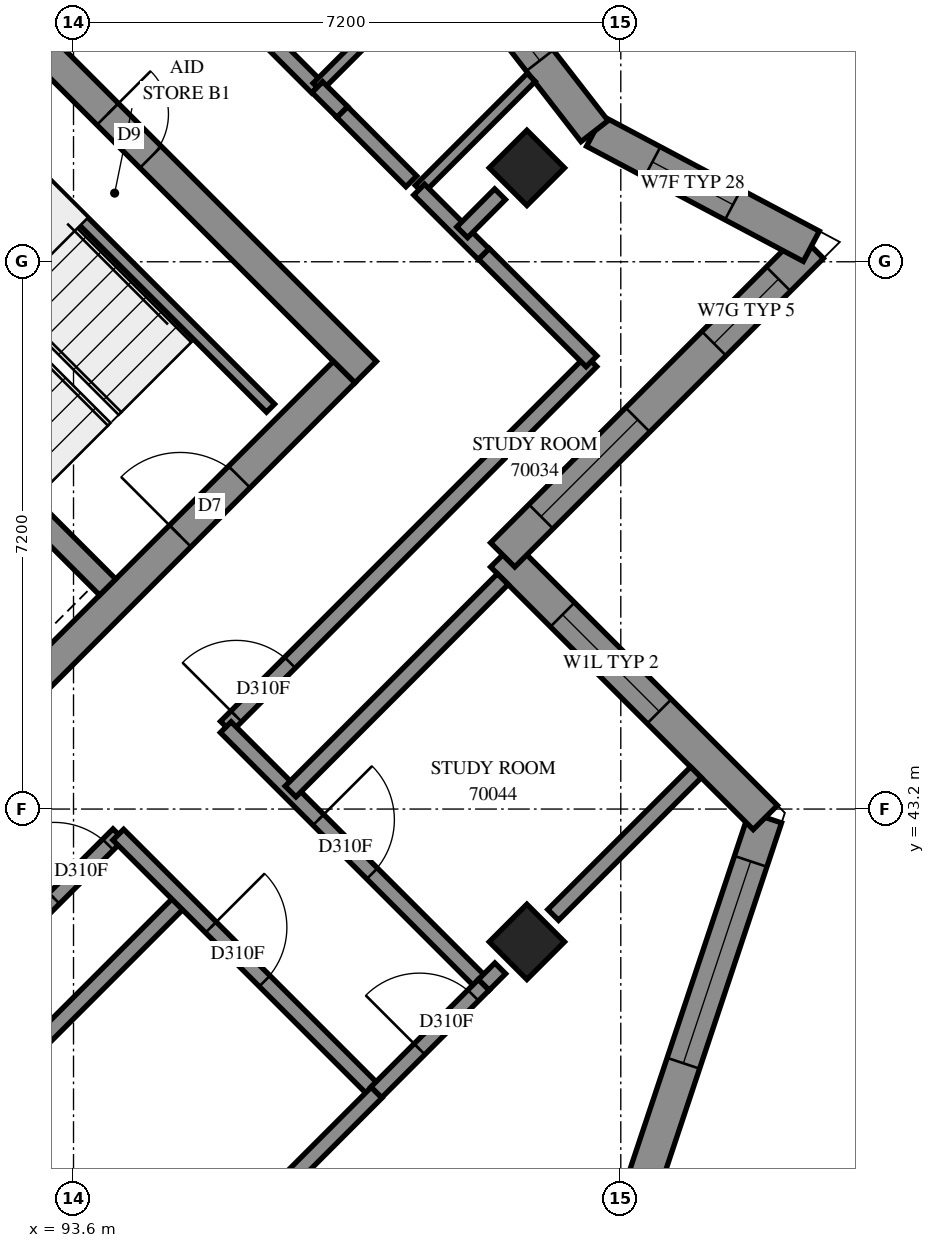
"""IFC4 building model, lengths in metres.
Left out: names, types, materials, properties, quantities, classifications, styles, units other than length and angle.
Written with IfcOpenShell. Run it as: python <this file> out.ifc"""

import sys

from ifc_helpers import new_model, si_unit, direction, frame, frame_2d, origin, origin_2d, place, context, subcontext, project, spatial, polyline, rectangle, outline, extrude, element, fill, save


model = new_model("IFC4")
c1 = context("Model", 3, precision=1e-05, world=origin(), true_north=direction((0.0, 1.0)))
c2 = subcontext(c1, "Body", "Model", "MODEL_VIEW")
j1 = project(units=[si_unit("LENGTHUNIT", "METRE"), si_unit("PLANEANGLEUNIT", "RADIAN")], contexts=[c1])
p1 = place(None, origin())
s1 = spatial("IfcSite", under=j1, at=p1, CompositionType="ELEMENT")
p2 = place(p1, origin())
s2 = spatial("IfcBuilding", under=s1, at=p2, CompositionType="ELEMENT")
p3 = place(p2, frame((0.0, 0.0, 257.4)))
s3 = spatial("IfcBuildingStorey", under=s2, at=p3, CompositionType="ELEMENT", Elevation=257.4)
for number, where, z_axis, x_axis in (
    (1, (99.565, 51.635, 0.0), (0.0, 0.0, 1.0), (0.707, -0.707, 0.0)),
    (2, (99.565, 41.453, 0.0), (0.0, 0.0, 1.0), (0.707, -0.707, 0.0)),
):
    element("IfcColumn", number, at=place(p3, frame(where, z_axis=z_axis, x_axis=x_axis)), inside=s3, PredefinedType="COLUMN", context=c2, shape_type="SweptSolid", body=[
        extrude(rectangle(XDim=0.7, YDim=0.7, at=origin_2d()), origin(), (0.0, 0.0, 1.0), 3.1),
    ])
p4 = place(p3, frame((86.695, 59.696, -0.3), z_axis=(0.0, 0.0, 1.0), x_axis=(0.7071100706, -0.7071034917, 0.0)))
e3 = element("IfcWall", 3, at=p4, inside=s3, PredefinedType="SHEAR", context=c2, shape_type="SweptSolid", body=[
    extrude(rectangle(XDim=15.2, YDim=0.4, at=frame_2d((7.6, 0.0))), origin(), (0.0, 0.0, 1.0), 2.7),
])
p5 = place(p4, frame((10.4, 0.0, 0.3)))
e4 = element("IfcOpeningElement", 4, at=p5, cuts=e3, PredefinedType="OPENING", context=c2, shape_type="SweptSolid", body=[
    extrude(rectangle(XDim=0.8, YDim=2.1, at=frame_2d((0.4, 1.05))), frame((0.0, 0.21, 0.0), z_axis=(0.0, -1.0, 0.0), x_axis=(1.0, 0.0, 0.0)), (0.0, 0.0, 1.0), 0.42),
])
p6 = place(p3, frame((86.978, 38.766, -0.3), z_axis=(0.0, 0.0, 1.0), x_axis=(0.7071067812, 0.7071067812, 0.0)))
e5 = element("IfcWall", 5, at=p6, inside=s3, PredefinedType="SHEAR", context=c2, shape_type="SweptSolid", body=[
    extrude(rectangle(XDim=14.4, YDim=0.4, at=frame_2d((7.2, 0.0))), origin(), (0.0, 0.0, 1.0), 2.7),
])
p7 = place(p6, frame((4.55, 0.0, 0.3)))
e6 = element("IfcOpeningElement", 6, at=p7, cuts=e5, PredefinedType="OPENING", context=c2, shape_type="SweptSolid", body=[
    extrude(rectangle(XDim=1.1, YDim=2.1, at=frame_2d((0.55, 1.05))), frame((0.0, 0.21, 0.0), z_axis=(0.0, -1.0, 0.0), x_axis=(1.0, 0.0, 0.0)), (0.0, 0.0, 1.0), 0.42),
])
p8 = place(p6, frame((11.35, 0.0, 0.3)))
e7 = element("IfcOpeningElement", 7, at=p8, cuts=e5, PredefinedType="OPENING", context=c2, shape_type="SweptSolid", body=[
    extrude(rectangle(XDim=1.1, YDim=2.1, at=frame_2d((0.55, 1.05))), frame((0.0, 0.21, 0.0), z_axis=(0.0, -1.0, 0.0), x_axis=(1.0, 0.0, 0.0)), (0.0, 0.0, 1.0), 0.42),
])
p9 = place(p3, frame((88.958, 51.211, 0.0), z_axis=(0.0, 0.0, 1.0), x_axis=(0.7070998367, -0.7071137256, 0.0)))
e8 = element("IfcWall", 8, at=p9, inside=s3, PredefinedType="SOLIDWALL", context=c2, shape_type="SweptSolid", body=[
    extrude(rectangle(XDim=7.2, YDim=0.3, at=frame_2d((3.6, 0.0))), origin(), (0.0, 0.0, 1.0), 3.1),
])
p10 = place(p3, frame((101.082, 38.232, 0.0), z_axis=(0.0, 0.0, 1.0), x_axis=(0.316227766, 0.9486832981, 0.0)))
e9 = element("IfcWall", 9, at=p10, inside=s3, PredefinedType="SOLIDWALL", context=c2, shape_type="SweptSolid", body=[
    extrude(outline(polyline([(-0.108, -0.225), (5.259, -0.225), (4.981, 0.225), (0.108, 0.225), (-0.108, -0.225)])), origin(), (0.0, 0.0, 1.0), 3.1),
])
p11 = place(p10, frame((1.711, 0.0, 0.45)))
e10 = element("IfcOpeningElement", 10, at=p11, cuts=e9, PredefinedType="OPENING", context=c2, shape_type="SweptSolid", body=[
    extrude(rectangle(XDim=2.8, YDim=2.55, at=frame_2d((1.4, 1.275))), frame((0.0, 0.235, 0.0), z_axis=(0.0, -1.0, 0.0), x_axis=(1.0, 0.0, 0.0)), (0.0, 0.0, 1.0), 0.47),
])
p12 = place(p3, frame((102.701, 43.089, 0.0), z_axis=(0.0, 0.0, 1.0), x_axis=(-0.7070965479, 0.7071170144, 0.0)))
e11 = element("IfcWall", 11, at=p12, inside=s3, PredefinedType="SOLIDWALL", context=c2, shape_type="SweptSolid", body=[
    extrude(outline(polyline([(-0.139, -0.225), (4.661, -0.225), (5.111, 0.225), (0.139, 0.225), (-0.139, -0.225)])), origin(), (0.0, 0.0, 1.0), 3.1),
])
p13 = place(p12, frame((1.974, 0.0, 0.6)))
e12 = element("IfcOpeningElement", 12, at=p13, cuts=e11, PredefinedType="OPENING", context=c2, shape_type="SweptSolid", body=[
    extrude(rectangle(XDim=1.8, YDim=1.9, at=frame_2d((0.9, 0.95))), frame((0.0, 0.235, 0.0), z_axis=(0.0, -1.0, 0.0), x_axis=(1.0, 0.0, 0.0)), (0.0, 0.0, 1.0), 0.47),
])
p14 = place(p3, frame((99.246, 46.544, 0.0), z_axis=(0.0, 0.0, 1.0), x_axis=(0.7071067812, 0.7071067812, 0.0)))
e13 = element("IfcWall", 13, at=p14, inside=s3, PredefinedType="SOLIDWALL", context=c2, shape_type="SweptSolid", body=[
    extrude(outline(polyline([(0.225, -0.225), (6.046, -0.225), (5.437, 0.225), (-0.225, 0.225), (0.225, -0.225)])), origin(), (0.0, 0.0, 1.0), 3.1),
])
p15 = place(p14, frame((0.713, 0.0, 0.6)))
e14 = element("IfcOpeningElement", 14, at=p15, cuts=e13, PredefinedType="OPENING", context=c2, shape_type="SweptSolid", body=[
    extrude(rectangle(XDim=1.8, YDim=1.9, at=frame_2d((0.9, 0.95))), frame((0.0, 0.235, 0.0), z_axis=(0.0, -1.0, 0.0), x_axis=(1.0, 0.0, 0.0)), (0.0, 0.0, 1.0), 0.47),
])
p16 = place(p14, frame((3.931, 0.0, 0.6)))
e15 = element("IfcOpeningElement", 15, at=p16, cuts=e13, PredefinedType="OPENING", context=c2, shape_type="SweptSolid", body=[
    extrude(rectangle(XDim=1.2, YDim=1.9, at=frame_2d((0.6, 0.95))), frame((0.0, 0.235, 0.0), z_axis=(0.0, -1.0, 0.0), x_axis=(1.0, 0.0, 0.0)), (0.0, 0.0, 1.0), 0.47),
])
p17 = place(p3, frame((103.306, 50.604, 0.0), z_axis=(0.0, 0.0, 1.0), x_axis=(-0.8832472045, 0.468907641, 0.0)))
e16 = element("IfcWall", 16, at=p17, inside=s3, PredefinedType="SOLIDWALL", context=c2, shape_type="SweptSolid", body=[
    extrude(outline(polyline([(-0.304, -0.225), (3.181, -0.225), (3.277, 0.225), (0.304, 0.225), (-0.304, -0.225)])), origin(), (0.0, 0.0, 1.0), 3.1),
])
p18 = place(p17, frame((1.167, 0.0, 0.45)))
e17 = element("IfcOpeningElement", 17, at=p18, cuts=e16, PredefinedType="OPENING", context=c2, shape_type="SweptSolid", body=[
    extrude(rectangle(XDim=1.2, YDim=2.55, at=frame_2d((0.6, 1.275))), frame((0.0, 0.235, 0.0), z_axis=(0.0, -1.0, 0.0), x_axis=(1.0, 0.0, 0.0)), (0.0, 0.0, 1.0), 0.47),
])
p19 = place(p3, frame((100.454, 52.118, 0.0), z_axis=(0.0, 0.0, 1.0), x_axis=(-0.6128744429, 0.7901803068, 0.0)))
e18 = element("IfcWall", 18, at=p19, inside=s3, PredefinedType="SOLIDWALL", context=c2, shape_type="SweptSolid", body=[
    extrude(outline(polyline([(0.048, -0.225), (3.407, -0.225), (3.35, 0.225), (-0.048, 0.225), (0.048, -0.225)])), origin(), (0.0, 0.0, 1.0), 3.1),
])
p20 = place(p19, frame((1.175, 0.0, 0.45)))
e19 = element("IfcOpeningElement", 19, at=p20, cuts=e18, PredefinedType="OPENING", context=c2, shape_type="SweptSolid", body=[
    extrude(rectangle(XDim=1.2, YDim=2.55, at=frame_2d((0.6, 1.275))), frame((0.0, 0.235, 0.0), z_axis=(0.0, -1.0, 0.0), x_axis=(1.0, 0.0, 0.0)), (0.0, 0.0, 1.0), 0.47),
])
p21 = place(p3, frame((91.313, 53.354, 0.0), z_axis=(0.0, 0.0, 1.0), x_axis=(0.7071140275, -0.7070995348, 0.0)))
e20 = element("IfcWall", 20, at=p21, inside=s3, PredefinedType="PARTITIONING", context=c2, shape_type="SweptSolid", body=[
    extrude(rectangle(XDim=6.9, YDim=0.15, at=frame_2d((3.45, 0.0))), origin(), (0.0, 0.0, 1.0), 3.1),
])
p22 = place(p3, frame((84.949, 31.932, 0.0), z_axis=(0.0, 0.0, 1.0), x_axis=(0.7071768688, 0.7070366866, 0.0)))
e21 = element("IfcWall", 21, at=p22, inside=s3, PredefinedType="PARTITIONING", context=c2, shape_type="SweptSolid", body=[
    extrude(rectangle(XDim=14.267, YDim=0.2, at=frame_2d((7.134, 0.0))), origin(), (0.0, 0.0, 1.0), 3.1),
])
p23 = place(p3, frame((86.836, 35.514, 0.0), z_axis=(0.0, 0.0, 1.0), x_axis=(0.7071067812, 0.7071067812, 0.0)))
e22 = element("IfcWall", 22, at=p23, inside=s3, PredefinedType="PARTITIONING", context=c2, shape_type="SweptSolid", body=[
    extrude(rectangle(XDim=10.4, YDim=0.2, at=frame_2d((5.2, 0.0))), origin(), (0.0, 0.0, 1.0), 3.1),
])
p24 = place(p23, frame((9.207, 0.0, 0.0)))
e23 = element("IfcOpeningElement", 23, at=p24, cuts=e22, PredefinedType="OPENING", context=c2, shape_type="SweptSolid", body=[
    extrude(rectangle(XDim=1.0, YDim=2.1, at=frame_2d((0.5, 1.05))), frame((0.0, 0.11, 0.0), z_axis=(0.0, -1.0, 0.0), x_axis=(1.0, 0.0, 0.0)), (0.0, 0.0, 1.0), 0.22),
])
p25 = place(p3, frame((95.605, 44.283, 0.0), z_axis=(0.0, 0.0, 1.0), x_axis=(0.7071067812, 0.7071067812, 0.0)))
e24 = element("IfcWall", 24, at=p25, inside=s3, PredefinedType="PARTITIONING", context=c2, shape_type="SweptSolid", body=[
    extrude(rectangle(XDim=6.8, YDim=0.2, at=frame_2d((3.4, 0.0))), origin(), (0.0, 0.0, 1.0), 3.1),
])
p26 = place(p25, frame((0.193, 0.0, 0.0)))
e25 = element("IfcOpeningElement", 25, at=p26, cuts=e24, PredefinedType="OPENING", context=c2, shape_type="SweptSolid", body=[
    extrude(rectangle(XDim=1.0, YDim=2.1, at=frame_2d((0.5, 1.05))), frame((0.0, 0.11, 0.0), z_axis=(0.0, -1.0, 0.0), x_axis=(1.0, 0.0, 0.0)), (0.0, 0.0, 1.0), 0.22),
])
p27 = place(p3, frame((95.603, 44.277, 0.0), z_axis=(0.0, 0.0, 1.0), x_axis=(0.7071067812, -0.7071067812, 0.0)))
e26 = element("IfcWall", 26, at=p27, inside=s3, PredefinedType="PARTITIONING", context=c2, shape_type="SweptSolid", body=[
    extrude(rectangle(XDim=4.797, YDim=0.2, at=frame_2d((2.398, 0.0))), origin(), (0.0, 0.0, 1.0), 3.1),
])
p28 = place(p27, frame((1.723, 0.0, 0.0)))
e27 = element("IfcOpeningElement", 27, at=p28, cuts=e26, PredefinedType="OPENING", context=c2, shape_type="SweptSolid", body=[
    extrude(rectangle(XDim=1.0, YDim=2.1, at=frame_2d((0.5, 1.05))), frame((0.0, 0.11, 0.0), z_axis=(0.0, -1.0, 0.0), x_axis=(1.0, 0.0, 0.0)), (0.0, 0.0, 1.0), 0.22),
])
p29 = place(p3, frame((94.189, 42.863, 0.0), z_axis=(0.0, 0.0, 1.0), x_axis=(0.7071067812, -0.7071067812, 0.0)))
e28 = element("IfcWall", 28, at=p29, inside=s3, PredefinedType="PARTITIONING", context=c2, shape_type="SweptSolid", body=[
    extrude(rectangle(XDim=4.797, YDim=0.2, at=frame_2d((2.398, 0.0))), origin(), (0.0, 0.0, 1.0), 3.1),
])
p30 = place(p29, frame((1.723, 0.0, 0.0)))
e29 = element("IfcOpeningElement", 29, at=p30, cuts=e28, PredefinedType="OPENING", context=c2, shape_type="SweptSolid", body=[
    extrude(rectangle(XDim=1.0, YDim=2.1, at=frame_2d((0.5, 1.05))), frame((0.0, 0.11, 0.0), z_axis=(0.0, -1.0, 0.0), x_axis=(1.0, 0.0, 0.0)), (0.0, 0.0, 1.0), 0.22),
])
p31 = place(p3, frame((93.621, 55.875, 0.0), z_axis=(0.0, 0.0, 1.0), x_axis=(0.7071067812, -0.7071067812, 0.0)))
e30 = element("IfcWall", 30, at=p31, inside=s3, PredefinedType="PARTITIONING", context=c2, shape_type="SweptSolid", body=[
    extrude(rectangle(XDim=4.5, YDim=0.2, at=frame_2d((2.25, 0.0))), origin(), (0.0, 0.0, 1.0), 3.1),
])
p32 = place(p31, frame((0.465, 0.0, 0.0)))
e31 = element("IfcOpeningElement", 31, at=p32, cuts=e30, PredefinedType="OPENING", context=c2, shape_type="SweptSolid", body=[
    extrude(rectangle(XDim=0.9, YDim=2.1, at=frame_2d((0.45, 1.05))), frame((0.0, 0.11, 0.0), z_axis=(0.0, -1.0, 0.0), x_axis=(1.0, 0.0, 0.0)), (0.0, 0.0, 1.0), 0.22),
])
p33 = place(p3, frame((94.828, 36.709, 0.0), z_axis=(0.0, 0.0, 1.0), x_axis=(0.7068506295, 0.7073628401, 0.0)))
e32 = element("IfcWall", 32, at=p33, inside=s3, PredefinedType="PARTITIONING", context=c2, shape_type="SweptSolid", body=[
    extrude(rectangle(XDim=3.905, YDim=0.2, at=frame_2d((1.952, 0.0))), origin(), (0.0, 0.0, 1.0), 2.6),
])
p34 = place(p3, frame((96.455, 43.431, 0.0), z_axis=(0.0, 0.0, 1.0), x_axis=(0.7068409254, 0.707372537, 0.0)))
e33 = element("IfcWall", 33, at=p34, inside=s3, PredefinedType="PARTITIONING", context=c2, shape_type="SweptSolid", body=[
    extrude(rectangle(XDim=3.95, YDim=0.2, at=frame_2d((1.975, 0.0))), origin(), (0.0, 0.0, 1.0), 3.1),
])
p35 = place(p3, frame((99.91, 41.807, 0.0), z_axis=(0.0, 0.0, 1.0), x_axis=(0.7075021757, 0.7067111654, 0.0)))
e34 = element("IfcWall", 34, at=p35, inside=s3, PredefinedType="PARTITIONING", context=c2, shape_type="SweptSolid", body=[
    extrude(rectangle(XDim=2.655, YDim=0.2, at=frame_2d((1.327, 0.0))), origin(), (0.0, 0.0, 1.0), 3.1),
])
p36 = place(p3, frame((96.806, 52.696, 0.0), z_axis=(0.0, 0.0, 1.0), x_axis=(0.7071067812, 0.7071067812, 0.0)))
e35 = element("IfcWall", 35, at=p36, inside=s3, PredefinedType="PARTITIONING", context=c2, shape_type="SweptSolid", body=[
    extrude(rectangle(XDim=2.322, YDim=0.15, at=frame_2d((1.161, 0.0))), origin(), (0.0, 0.0, 1.0), 3.1),
])
p37 = place(p36, frame((1.212, 0.0, 0.0)))
e36 = element("IfcOpeningElement", 36, at=p37, cuts=e35, PredefinedType="OPENING", context=c2, shape_type="SweptSolid", body=[
    extrude(rectangle(XDim=0.8, YDim=2.1, at=frame_2d((0.4, 1.05))), frame((0.0, 0.085, 0.0), z_axis=(0.0, -1.0, 0.0), x_axis=(1.0, 0.0, 0.0)), (0.0, 0.0, 1.0), 0.17),
])
p38 = place(p3, frame((98.149, 51.353, 0.0), z_axis=(0.0, 0.0, 1.0), x_axis=(0.7070827679, 0.7071307936, 0.0)))
e37 = element("IfcWall", 37, at=p38, inside=s3, PredefinedType="PARTITIONING", context=c2, shape_type="SweptSolid", body=[
    extrude(rectangle(XDim=2.082, YDim=0.15, at=frame_2d((1.041, 0.0))), origin(), (0.0, 0.0, 1.0), 3.1),
])
p39 = place(p3, frame((98.998, 50.504, 0.0), z_axis=(0.0, 0.0, 1.0), x_axis=(0.7076063266, -0.7066068826, 0.0)))
e38 = element("IfcWall", 38, at=p39, inside=s3, PredefinedType="PARTITIONING", context=c2, shape_type="SweptSolid", body=[
    extrude(rectangle(XDim=2.001, YDim=0.2, at=frame_2d((1.001, 0.0))), origin(), (0.0, 0.0, 1.0), 3.1),
])
p40 = place(p3, frame((97.584, 39.474, 0.0), z_axis=(0.0, 0.0, 1.0), x_axis=(0.7071067812, 0.7071067812, 0.0)))
e39 = element("IfcWall", 39, at=p40, inside=s3, PredefinedType="PARTITIONING", context=c2, shape_type="SweptSolid", body=[
    extrude(rectangle(XDim=2.0, YDim=0.2, at=frame_2d((1.0, 0.0))), origin(), (0.0, 0.0, 1.0), 2.6),
])
p41 = place(p40, frame((0.803, 0.0, 0.0)))
e40 = element("IfcOpeningElement", 40, at=p41, cuts=e39, PredefinedType="OPENING", context=c2, shape_type="SweptSolid", body=[
    extrude(rectangle(XDim=1.0, YDim=2.1, at=frame_2d((0.5, 1.05))), frame((0.0, 0.11, 0.0), z_axis=(0.0, -1.0, 0.0), x_axis=(1.0, 0.0, 0.0)), (0.0, 0.0, 1.0), 0.22),
])
p42 = place(p3, frame((97.134, 52.37, 0.0), z_axis=(0.0, 0.0, 1.0), x_axis=(0.7063301682, -0.7078825422, 0.0)))
e41 = element("IfcWall", 41, at=p42, inside=s3, PredefinedType="PARTITIONING", context=c2, shape_type="SweptSolid", body=[
    extrude(rectangle(XDim=1.288, YDim=0.2, at=frame_2d((0.644, 0.0))), origin(), (0.0, 0.0, 1.0), 3.1),
])
p43 = place(p3, frame((98.147, 51.349, 0.0), z_axis=(0.0, 0.0, 1.0), x_axis=(0.7071067812, -0.7071067812, 0.0)))
e42 = element("IfcWall", 42, at=p43, inside=s3, PredefinedType="PARTITIONING", context=c2, shape_type="SweptSolid", body=[
    extrude(rectangle(XDim=1.199, YDim=0.2, at=frame_2d((0.6, 0.0))), origin(), (0.0, 0.0, 1.0), 3.1),
])
p44 = place(p3, frame((98.714, 50.788, 0.0), z_axis=(0.0, 0.0, 1.0), x_axis=(0.7056883165, 0.7085224061, 0.0)))
e43 = element("IfcWall", 43, at=p44, inside=s3, PredefinedType="PARTITIONING", context=c2, shape_type="SweptSolid", body=[
    extrude(rectangle(XDim=0.706, YDim=0.2, at=frame_2d((0.353, 0.0))), origin(), (0.0, 0.0, 1.0), 3.1),
])
p45 = place(p3, frame((96.807, 52.697, 0.0), z_axis=(0.0, 0.0, 1.0), x_axis=(0.7092658707, -0.7049410788, 0.0)))
e44 = element("IfcWall", 44, at=p45, inside=s3, PredefinedType="PARTITIONING", context=c2, shape_type="SweptSolid", body=[
    extrude(rectangle(XDim=0.462, YDim=0.2, at=frame_2d((0.231, 0.0))), origin(), (0.0, 0.0, 1.0), 3.1),
])
p46 = place(p3, frame((98.998, 40.888, 0.0), z_axis=(0.0, 0.0, 1.0), x_axis=(0.7071067812, 0.7071067812, 0.0)))
e45 = element("IfcWall", 45, at=p46, inside=s3, PredefinedType="PARTITIONING", context=c2, shape_type="SweptSolid", body=[
    extrude(rectangle(XDim=0.305, YDim=0.2, at=frame_2d((0.153, 0.0))), origin(), (0.0, 0.0, 1.0), 2.6),
])
p47 = place(p11, origin())
e46 = element("IfcWindow", 46, at=p47, inside=s3, PartitioningType="SINGLE_PANEL", PredefinedType="WINDOW", context=c2, shape_type="SweptSolid", body=[
    extrude(rectangle(XDim=2.8, YDim=2.55, at=frame_2d((1.4, 1.275))), frame((0.0, 0.205, 0.0), z_axis=(0.0, -1.0, 0.0), x_axis=(1.0, 0.0, 0.0)), (0.0, 0.0, 1.0), 0.06),
])
fill(e10, e46)
p48 = place(p13, origin())
e47 = element("IfcWindow", 47, at=p48, inside=s3, PartitioningType="SINGLE_PANEL", PredefinedType="WINDOW", context=c2, shape_type="SweptSolid", body=[
    extrude(rectangle(XDim=1.8, YDim=1.9, at=frame_2d((0.9, 0.95))), frame((0.0, 0.205, 0.0), z_axis=(0.0, -1.0, 0.0), x_axis=(1.0, 0.0, 0.0)), (0.0, 0.0, 1.0), 0.06),
])
fill(e12, e47)
p49 = place(p15, origin())
e48 = element("IfcWindow", 48, at=p49, inside=s3, PartitioningType="SINGLE_PANEL", PredefinedType="WINDOW", context=c2, shape_type="SweptSolid", body=[
    extrude(rectangle(XDim=1.8, YDim=1.9, at=frame_2d((0.9, 0.95))), frame((0.0, 0.205, 0.0), z_axis=(0.0, -1.0, 0.0), x_axis=(1.0, 0.0, 0.0)), (0.0, 0.0, 1.0), 0.06),
])
fill(e14, e48)
p50 = place(p16, origin())
e49 = element("IfcWindow", 49, at=p50, inside=s3, PartitioningType="SINGLE_PANEL", PredefinedType="WINDOW", context=c2, shape_type="SweptSolid", body=[
    extrude(rectangle(XDim=1.2, YDim=1.9, at=frame_2d((0.6, 0.95))), frame((0.0, 0.205, 0.0), z_axis=(0.0, -1.0, 0.0), x_axis=(1.0, 0.0, 0.0)), (0.0, 0.0, 1.0), 0.06),
])
fill(e15, e49)
p51 = place(p18, origin())
e50 = element("IfcWindow", 50, at=p51, inside=s3, PartitioningType="SINGLE_PANEL", PredefinedType="WINDOW", context=c2, shape_type="SweptSolid", body=[
    extrude(rectangle(XDim=1.2, YDim=2.55, at=frame_2d((0.6, 1.275))), frame((0.0, 0.205, 0.0), z_axis=(0.0, -1.0, 0.0), x_axis=(1.0, 0.0, 0.0)), (0.0, 0.0, 1.0), 0.06),
])
fill(e17, e50)
p52 = place(p20, origin())
e51 = element("IfcWindow", 51, at=p52, inside=s3, PartitioningType="SINGLE_PANEL", PredefinedType="WINDOW", context=c2, shape_type="SweptSolid", body=[
    extrude(rectangle(XDim=1.2, YDim=2.55, at=frame_2d((0.6, 1.275))), frame((0.0, 0.205, 0.0), z_axis=(0.0, -1.0, 0.0), x_axis=(1.0, 0.0, 0.0)), (0.0, 0.0, 1.0), 0.06),
])
fill(e19, e51)
p53 = place(p5, origin())
e52 = element("IfcDoor", 52, at=p53, inside=s3, OperationType="SINGLE_SWING_RIGHT", PredefinedType="DOOR", context=c2, shape_type="SweptSolid", body=[
    extrude(rectangle(XDim=0.8, YDim=2.1, at=frame_2d((0.4, 1.05))), frame((0.0, 0.025, 0.0), z_axis=(0.0, -1.0, 0.0), x_axis=(1.0, 0.0, 0.0)), (0.0, 0.0, 1.0), 0.05),
])
fill(e4, e52)
p54 = place(p8, origin())
e53 = element("IfcDoor", 53, at=p54, inside=s3, OperationType="SINGLE_SWING_RIGHT", PredefinedType="DOOR", context=c2, shape_type="SweptSolid", body=[
    extrude(rectangle(XDim=1.1, YDim=2.1, at=frame_2d((0.55, 1.05))), frame((0.0, 0.025, 0.0), z_axis=(0.0, -1.0, 0.0), x_axis=(1.0, 0.0, 0.0)), (0.0, 0.0, 1.0), 0.05),
])
fill(e7, e53)
p55 = place(p26, origin())
e54 = element("IfcDoor", 54, at=p55, inside=s3, OperationType="SINGLE_SWING_LEFT", PredefinedType="DOOR", context=c2, shape_type="SweptSolid", body=[
    extrude(rectangle(XDim=1.0, YDim=2.1, at=frame_2d((0.5, 1.05))), frame((0.0, 0.025, 0.0), z_axis=(0.0, -1.0, 0.0), x_axis=(1.0, 0.0, 0.0)), (0.0, 0.0, 1.0), 0.05),
])
fill(e25, e54)
p56 = place(p24, origin())
e55 = element("IfcDoor", 55, at=p56, inside=s3, OperationType="SINGLE_SWING_RIGHT", PredefinedType="DOOR", context=c2, shape_type="SweptSolid", body=[
    extrude(rectangle(XDim=1.0, YDim=2.1, at=frame_2d((0.5, 1.05))), frame((0.0, 0.025, 0.0), z_axis=(0.0, -1.0, 0.0), x_axis=(1.0, 0.0, 0.0)), (0.0, 0.0, 1.0), 0.05),
])
fill(e23, e55)
p57 = place(p30, origin())
e56 = element("IfcDoor", 56, at=p57, inside=s3, OperationType="SINGLE_SWING_LEFT", PredefinedType="DOOR", context=c2, shape_type="SweptSolid", body=[
    extrude(rectangle(XDim=1.0, YDim=2.1, at=frame_2d((0.5, 1.05))), frame((0.0, 0.025, 0.0), z_axis=(0.0, -1.0, 0.0), x_axis=(1.0, 0.0, 0.0)), (0.0, 0.0, 1.0), 0.05),
])
fill(e29, e56)
p58 = place(p28, origin())
e57 = element("IfcDoor", 57, at=p58, inside=s3, OperationType="SINGLE_SWING_RIGHT", PredefinedType="DOOR", context=c2, shape_type="SweptSolid", body=[
    extrude(rectangle(XDim=1.0, YDim=2.1, at=frame_2d((0.5, 1.05))), frame((0.0, 0.025, 0.0), z_axis=(0.0, -1.0, 0.0), x_axis=(1.0, 0.0, 0.0)), (0.0, 0.0, 1.0), 0.05),
])
fill(e27, e57)
p59 = place(p41, origin())
e58 = element("IfcDoor", 58, at=p59, inside=s3, OperationType="SINGLE_SWING_RIGHT", PredefinedType="DOOR", context=c2, shape_type="SweptSolid", body=[
    extrude(rectangle(XDim=1.0, YDim=2.1, at=frame_2d((0.5, 1.05))), frame((0.0, 0.025, 0.0), z_axis=(0.0, -1.0, 0.0), x_axis=(1.0, 0.0, 0.0)), (0.0, 0.0, 1.0), 0.05),
])
fill(e40, e58)
save(model, sys.argv[1])
